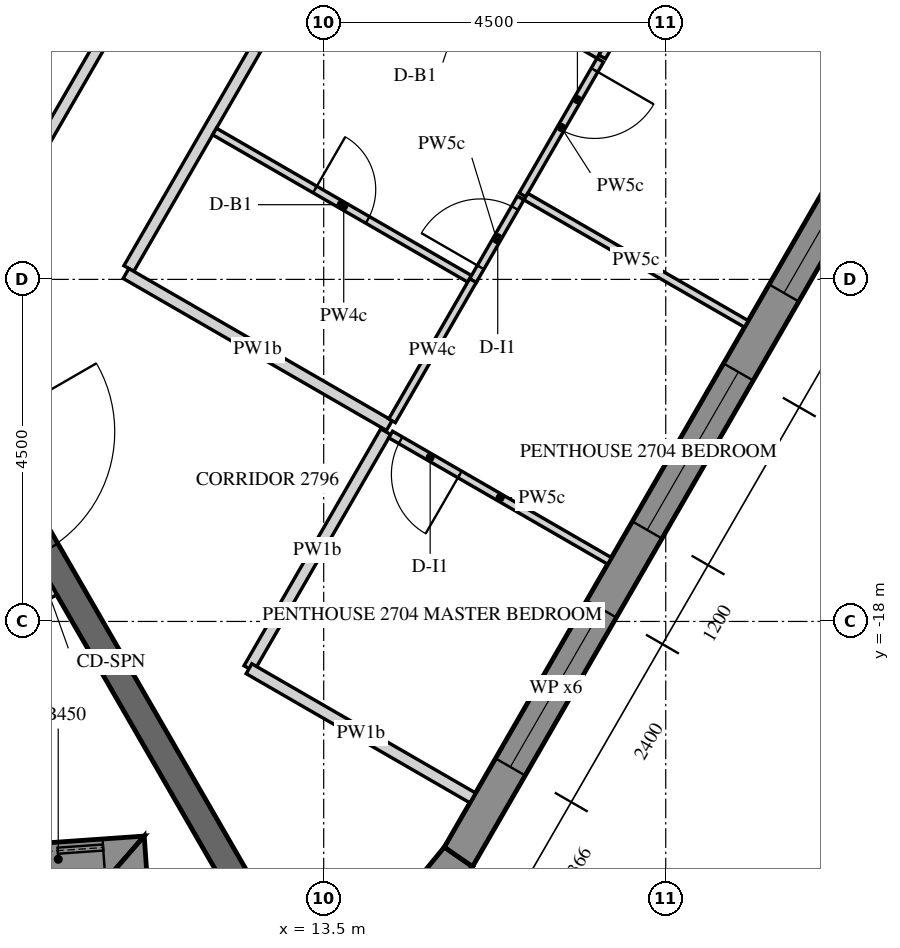
"""IFC4 building model, lengths in metres.
Left out: names, types, materials, properties, quantities, classifications, styles, units other than length and angle.
Written with IfcOpenShell. Run it as: python <this file> out.ifc"""

import sys

from ifc_helpers import new_model, si_unit, direction, frame, frame_2d, origin, place, context, subcontext, project, spatial, polyline, rectangle, outline, extrude, element, fill, save


model = new_model("IFC4")
c1 = context("Model", 3, precision=1e-05, world=origin(), true_north=direction((0.0, 1.0)))
c2 = subcontext(c1, "Body", "Model", "MODEL_VIEW")
j1 = project(units=[si_unit("LENGTHUNIT", "METRE"), si_unit("PLANEANGLEUNIT", "RADIAN")], contexts=[c1])
p1 = place(None, origin())
s1 = spatial("IfcSite", under=j1, at=p1, CompositionType="ELEMENT")
p2 = place(p1, origin())
s2 = spatial("IfcBuilding", under=s1, at=p2, CompositionType="ELEMENT")
p3 = place(p2, frame((0.0, 0.0, 353.4)))
s3 = spatial("IfcBuildingStorey", under=s2, at=p3, CompositionType="ELEMENT", Elevation=353.4)
p4 = place(p3, frame((-9.751, -22.51, -0.15), z_axis=(0.0, 0.0, 1.0), x_axis=(0.997564460173, 0.06975061147, 0.0)))
e1 = element("IfcWall", 1, at=p4, inside=s3, PredefinedType="SOLIDWALL", context=c2, shape_type="SweptSolid", body=[
    extrude(outline(polyline([(0.225, -0.225), (20.507, -0.225), (20.957, 0.225), (-0.225, 0.225), (0.225, -0.225)])), origin(), (0.0, 0.0, 1.0), 3.9),
])
p5 = place(p4, frame((0.325, 0.0, 1.05)))
e2 = element("IfcOpeningElement", 2, at=p5, cuts=e1, PredefinedType="OPENING", context=c2, shape_type="SweptSolid", body=[
    extrude(rectangle(XDim=0.9, YDim=1.5, at=frame_2d((0.45, 0.75))), frame((0.0, 0.235, 0.0), z_axis=(0.0, -1.0, 0.0), x_axis=(1.0, 0.0, 0.0)), (0.0, 0.0, 1.0), 0.47),
])
p6 = place(p4, frame((1.525, 0.0, 0.15)))
e3 = element("IfcOpeningElement", 3, at=p6, cuts=e1, PredefinedType="OPENING", context=c2, shape_type="SweptSolid", body=[
    extrude(rectangle(XDim=1.2, YDim=2.4, at=frame_2d((0.6, 1.2))), frame((0.0, 0.235, 0.0), z_axis=(0.0, -1.0, 0.0), x_axis=(1.0, 0.0, 0.0)), (0.0, 0.0, 1.0), 0.47),
])
p7 = place(p4, frame((3.766, 0.0, 1.05)))
e4 = element("IfcOpeningElement", 4, at=p7, cuts=e1, PredefinedType="OPENING", context=c2, shape_type="SweptSolid", body=[
    extrude(rectangle(XDim=0.9, YDim=1.5, at=frame_2d((0.45, 0.75))), frame((0.0, 0.235, 0.0), z_axis=(0.0, -1.0, 0.0), x_axis=(1.0, 0.0, 0.0)), (0.0, 0.0, 1.0), 0.47),
])
p8 = place(p4, frame((4.966, 0.0, 0.15)))
e5 = element("IfcOpeningElement", 5, at=p8, cuts=e1, PredefinedType="OPENING", context=c2, shape_type="SweptSolid", body=[
    extrude(rectangle(XDim=1.2, YDim=2.4, at=frame_2d((0.6, 1.2))), frame((0.0, 0.235, 0.0), z_axis=(0.0, -1.0, 0.0), x_axis=(1.0, 0.0, 0.0)), (0.0, 0.0, 1.0), 0.47),
])
p9 = place(p4, frame((7.366, 0.0, 1.05)))
e6 = element("IfcOpeningElement", 6, at=p9, cuts=e1, PredefinedType="OPENING", context=c2, shape_type="SweptSolid", body=[
    extrude(rectangle(XDim=0.9, YDim=1.5, at=frame_2d((0.45, 0.75))), frame((0.0, 0.235, 0.0), z_axis=(0.0, -1.0, 0.0), x_axis=(1.0, 0.0, 0.0)), (0.0, 0.0, 1.0), 0.47),
])
p10 = place(p4, frame((8.566, 0.0, 0.15)))
e7 = element("IfcOpeningElement", 7, at=p10, cuts=e1, PredefinedType="OPENING", context=c2, shape_type="SweptSolid", body=[
    extrude(rectangle(XDim=1.2, YDim=2.4, at=frame_2d((0.6, 1.2))), frame((0.0, 0.235, 0.0), z_axis=(0.0, -1.0, 0.0), x_axis=(1.0, 0.0, 0.0)), (0.0, 0.0, 1.0), 0.47),
])
p11 = place(p4, frame((10.966, 0.0, 1.05)))
e8 = element("IfcOpeningElement", 8, at=p11, cuts=e1, PredefinedType="OPENING", context=c2, shape_type="SweptSolid", body=[
    extrude(rectangle(XDim=0.9, YDim=1.5, at=frame_2d((0.45, 0.75))), frame((0.0, 0.235, 0.0), z_axis=(0.0, -1.0, 0.0), x_axis=(1.0, 0.0, 0.0)), (0.0, 0.0, 1.0), 0.47),
])
p12 = place(p4, frame((12.166, 0.0, 0.15)))
e9 = element("IfcOpeningElement", 9, at=p12, cuts=e1, PredefinedType="OPENING", context=c2, shape_type="SweptSolid", body=[
    extrude(rectangle(XDim=1.2, YDim=2.4, at=frame_2d((0.6, 1.2))), frame((0.0, 0.235, 0.0), z_axis=(0.0, -1.0, 0.0), x_axis=(1.0, 0.0, 0.0)), (0.0, 0.0, 1.0), 0.47),
])
p13 = place(p4, frame((14.566, 0.0, 1.05)))
e10 = element("IfcOpeningElement", 10, at=p13, cuts=e1, PredefinedType="OPENING", context=c2, shape_type="SweptSolid", body=[
    extrude(rectangle(XDim=0.9, YDim=1.5, at=frame_2d((0.45, 0.75))), frame((0.0, 0.235, 0.0), z_axis=(0.0, -1.0, 0.0), x_axis=(1.0, 0.0, 0.0)), (0.0, 0.0, 1.0), 0.47),
])
p14 = place(p4, frame((15.766, 0.0, 0.15)))
e11 = element("IfcOpeningElement", 11, at=p14, cuts=e1, PredefinedType="OPENING", context=c2, shape_type="SweptSolid", body=[
    extrude(rectangle(XDim=1.2, YDim=2.4, at=frame_2d((0.6, 1.2))), frame((0.0, 0.235, 0.0), z_axis=(0.0, -1.0, 0.0), x_axis=(1.0, 0.0, 0.0)), (0.0, 0.0, 1.0), 0.47),
])
p15 = place(p4, frame((18.007, 0.0, 1.05)))
e12 = element("IfcOpeningElement", 12, at=p15, cuts=e1, PredefinedType="OPENING", context=c2, shape_type="SweptSolid", body=[
    extrude(rectangle(XDim=0.9, YDim=1.5, at=frame_2d((0.45, 0.75))), frame((0.0, 0.235, 0.0), z_axis=(0.0, -1.0, 0.0), x_axis=(1.0, 0.0, 0.0)), (0.0, 0.0, 1.0), 0.47),
])
p16 = place(p4, frame((19.207, 0.0, 0.15)))
e13 = element("IfcOpeningElement", 13, at=p16, cuts=e1, PredefinedType="OPENING", context=c2, shape_type="SweptSolid", body=[
    extrude(rectangle(XDim=1.2, YDim=2.4, at=frame_2d((0.6, 1.2))), frame((0.0, 0.235, 0.0), z_axis=(0.0, -1.0, 0.0), x_axis=(1.0, 0.0, 0.0)), (0.0, 0.0, 1.0), 0.47),
])
p17 = place(p3, frame((10.93, -21.064, -0.15), z_axis=(0.0, 0.0, 1.0), x_axis=(0.069702791886, -0.99756780261, 0.0)))
e14 = element("IfcWall", 14, at=p17, inside=s3, PredefinedType="SOLIDWALL", context=c2, shape_type="SweptSolid", body=[
    extrude(outline(polyline([(0.225, -0.225), (2.225, -0.225), (1.775, 0.225), (-0.225, 0.225), (0.225, -0.225)])), origin(), (0.0, 0.0, 1.0), 3.9),
])
p18 = place(p3, frame((14.497, -22.044, -0.15), z_axis=(0.0, 0.0, 1.0), x_axis=(0.633867343651, 0.773441782329, 0.0)))
e15 = element("IfcWall", 15, at=p18, inside=s3, PredefinedType="SOLIDWALL", context=c2, shape_type="SweptSolid", body=[
    extrude(outline(polyline([(-0.037, -0.225), (1.243, -0.225), (1.206, 0.225), (0.037, 0.225), (-0.037, -0.225)])), origin(), (0.0, 0.0, 1.0), 3.9),
])
p19 = place(p3, frame((15.273, -21.097, -0.15), z_axis=(0.0, 0.0, 1.0), x_axis=(0.499997453958, 0.866026873738, 0.0)))
e16 = element("IfcWall", 16, at=p19, inside=s3, PredefinedType="SOLIDWALL", context=c2, shape_type="SweptSolid", body=[
    extrude(outline(polyline([(-0.018, -0.225), (23.152, -0.225), (23.11, 0.225), (0.018, 0.225), (-0.018, -0.225)])), origin(), (0.0, 0.0, 1.0), 3.9),
])
p20 = place(p19, frame((1.366, 0.0, 0.45)))
e17 = element("IfcOpeningElement", 17, at=p20, cuts=e16, PredefinedType="OPENING", context=c2, shape_type="SweptSolid", body=[
    extrude(rectangle(XDim=2.4, YDim=3.0, at=frame_2d((1.2, 1.5))), frame((0.0, 0.235, 0.0), z_axis=(0.0, -1.0, 0.0), x_axis=(1.0, 0.0, 0.0)), (0.0, 0.0, 1.0), 0.47),
])
p21 = place(p19, frame((4.966, 0.0, 0.45)))
e18 = element("IfcOpeningElement", 18, at=p21, cuts=e16, PredefinedType="OPENING", context=c2, shape_type="SweptSolid", body=[
    extrude(rectangle(XDim=2.4, YDim=3.0, at=frame_2d((1.2, 1.5))), frame((0.0, 0.235, 0.0), z_axis=(0.0, -1.0, 0.0), x_axis=(1.0, 0.0, 0.0)), (0.0, 0.0, 1.0), 0.47),
])
p22 = place(p19, frame((8.566, 0.0, 0.45)))
e19 = element("IfcOpeningElement", 19, at=p22, cuts=e16, PredefinedType="OPENING", context=c2, shape_type="SweptSolid", body=[
    extrude(rectangle(XDim=2.4, YDim=3.0, at=frame_2d((1.2, 1.5))), frame((0.0, 0.235, 0.0), z_axis=(0.0, -1.0, 0.0), x_axis=(1.0, 0.0, 0.0)), (0.0, 0.0, 1.0), 0.47),
])
p23 = place(p19, frame((12.166, 0.0, 0.45)))
e20 = element("IfcOpeningElement", 20, at=p23, cuts=e16, PredefinedType="OPENING", context=c2, shape_type="SweptSolid", body=[
    extrude(rectangle(XDim=2.4, YDim=3.0, at=frame_2d((1.2, 1.5))), frame((0.0, 0.235, 0.0), z_axis=(0.0, -1.0, 0.0), x_axis=(1.0, 0.0, 0.0)), (0.0, 0.0, 1.0), 0.47),
])
p24 = place(p19, frame((15.766, 0.0, 0.45)))
e21 = element("IfcOpeningElement", 21, at=p24, cuts=e16, PredefinedType="OPENING", context=c2, shape_type="SweptSolid", body=[
    extrude(rectangle(XDim=2.4, YDim=3.0, at=frame_2d((1.2, 1.5))), frame((0.0, 0.235, 0.0), z_axis=(0.0, -1.0, 0.0), x_axis=(1.0, 0.0, 0.0)), (0.0, 0.0, 1.0), 0.47),
])
p25 = place(p19, frame((19.366, 0.0, 0.45)))
e22 = element("IfcOpeningElement", 22, at=p25, cuts=e16, PredefinedType="OPENING", context=c2, shape_type="SweptSolid", body=[
    extrude(rectangle(XDim=2.4, YDim=3.0, at=frame_2d((1.2, 1.5))), frame((0.0, 0.235, 0.0), z_axis=(0.0, -1.0, 0.0), x_axis=(1.0, 0.0, 0.0)), (0.0, 0.0, 1.0), 0.47),
])
p26 = place(p3, frame((5.773, -10.0, -0.15), z_axis=(0.0, 0.0, 1.0), x_axis=(0.500007911273, -0.866020836161, 0.0)))
e23 = element("IfcWall", 23, at=p26, inside=s3, PredefinedType="SHEAR", context=c2, shape_type="SweptSolid", body=[
    extrude(rectangle(XDim=14.51, YDim=0.35, at=frame_2d((7.255, 0.0))), origin(), (0.0, 0.0, 1.0), 3.9),
])
p27 = place(p26, frame((6.355, 0.0, 0.15)))
e24 = element("IfcOpeningElement", 24, at=p27, cuts=e23, PredefinedType="OPENING", context=c2, shape_type="SweptSolid", body=[
    extrude(rectangle(XDim=1.8, YDim=2.4, at=frame_2d((0.9, 1.2))), frame((0.0, 0.185, 0.0), z_axis=(0.0, -1.0, 0.0), x_axis=(1.0, 0.0, 0.0)), (0.0, 0.0, 1.0), 0.37),
])
p28 = place(p3, frame((8.456, -18.446, 0.0), z_axis=(0.0, 0.0, 1.0), x_axis=(0.866013532718, 0.500020560727, 0.0)))
e25 = element("IfcWall", 25, at=p28, inside=s3, PredefinedType="PARTITIONING", context=c2, shape_type="SweptSolid", body=[
    extrude(rectangle(XDim=1.725, YDim=0.15, at=frame_2d((0.863, 0.0))), origin(), (0.0, 0.0, 1.0), 2.82),
])
p29 = place(p3, frame((10.937, -13.357, 0.0), z_axis=(0.0, 0.0, 1.0), x_axis=(0.499993317597, 0.866029261837, 0.0)))
e26 = element("IfcWall", 26, at=p29, inside=s3, PredefinedType="PARTITIONING", context=c2, shape_type="SweptSolid", body=[
    extrude(rectangle(XDim=13.966, YDim=0.15, at=frame_2d((6.983, 0.0))), origin(), (0.0, 0.0, 1.0), 2.82),
])
p30 = place(p29, frame((3.325, 0.0, 0.0)))
e27 = element("IfcOpeningElement", 27, at=p30, cuts=e26, PredefinedType="OPENING", context=c2, shape_type="SweptSolid", body=[
    extrude(rectangle(XDim=1.0, YDim=2.1, at=frame_2d((0.5, 1.05))), frame((0.0, 0.085, 0.0), z_axis=(0.0, -1.0, 0.0), x_axis=(1.0, 0.0, 0.0)), (0.0, 0.0, 1.0), 0.17),
])
p31 = place(p3, frame((14.363, -15.422, 0.0), z_axis=(0.0, 0.0, 1.0), x_axis=(-0.866026010844, 0.49999894854, 0.0)))
e28 = element("IfcWall", 28, at=p31, inside=s3, PredefinedType="PARTITIONING", context=c2, shape_type="SweptSolid", body=[
    extrude(rectangle(XDim=4.0, YDim=0.15, at=frame_2d((2.0, 0.0))), origin(), (0.0, 0.0, 1.0), 2.82),
])
p32 = place(p3, frame((12.517, -18.62, 0.0), z_axis=(0.0, 0.0, 1.0), x_axis=(0.500006299954, 0.866021766474, 0.0)))
e29 = element("IfcWall", 29, at=p32, inside=s3, PredefinedType="PARTITIONING", context=c2, shape_type="SweptSolid", body=[
    extrude(rectangle(XDim=3.599, YDim=0.15, at=frame_2d((1.799, 0.0))), origin(), (0.0, 0.0, 1.0), 2.82),
])
p33 = place(p3, frame((15.461, -20.321, 0.0), z_axis=(0.0, 0.0, 1.0), x_axis=(-0.866010935101, 0.500025059658, 0.0)))
e30 = element("IfcWall", 30, at=p33, inside=s3, PredefinedType="PARTITIONING", context=c2, shape_type="SweptSolid", body=[
    extrude(rectangle(XDim=3.399, YDim=0.15, at=frame_2d((1.699, 0.0))), origin(), (0.0, 0.0, 1.0), 2.82),
])
p34 = place(p3, frame((11.879, -8.124, 0.0), z_axis=(0.0, 0.0, 1.0), x_axis=(-0.500006178143, -0.866021836803, 0.0)))
e31 = element("IfcWall", 31, at=p34, inside=s3, PredefinedType="PARTITIONING", context=c2, shape_type="SweptSolid", body=[
    extrude(rectangle(XDim=4.122, YDim=0.15, at=frame_2d((2.061, 0.0))), origin(), (0.0, 0.0, 1.0), 2.82),
])
p35 = place(p3, frame((17.138, -10.616, 0.0), z_axis=(0.0, 0.0, 1.0), x_axis=(-0.500015134316, -0.866016665807, 0.0)))
e32 = element("IfcWall", 32, at=p35, inside=s3, PredefinedType="PARTITIONING", context=c2, shape_type="SweptSolid", body=[
    extrude(rectangle(XDim=2.046, YDim=0.1, at=frame_2d((1.023, 0.0))), origin(), (0.0, 0.0, 1.0), 2.82),
])
p36 = place(p35, frame((0.15, 0.0, 0.0)))
e33 = element("IfcOpeningElement", 33, at=p36, cuts=e32, PredefinedType="OPENING", context=c2, shape_type="SweptSolid", body=[
    extrude(rectangle(XDim=0.9, YDim=2.1, at=frame_2d((0.45, 1.05))), frame((0.0, 0.06, 0.0), z_axis=(0.0, -1.0, 0.0), x_axis=(1.0, 0.0, 0.0)), (0.0, 0.0, 1.0), 0.12),
])
p37 = place(p3, frame((16.159, -12.411, 0.0), z_axis=(0.0, 0.0, 1.0), x_axis=(0.866032680314, -0.499987396469, 0.0)))
e34 = element("IfcWall", 34, at=p37, inside=s3, PredefinedType="PARTITIONING", context=c2, shape_type="SweptSolid", body=[
    extrude(rectangle(XDim=3.35, YDim=0.1, at=frame_2d((1.675, 0.0))), origin(), (0.0, 0.0, 1.0), 2.82),
])
p38 = place(p3, frame((18.263, -8.667, 0.0), z_axis=(0.0, 0.0, 1.0), x_axis=(-0.50002983664, -0.866008176907, 0.0)))
e35 = element("IfcWall", 35, at=p38, inside=s3, PredefinedType="PARTITIONING", context=c2, shape_type="SweptSolid", body=[
    extrude(rectangle(XDim=2.2, YDim=0.1, at=frame_2d((1.1, 0.0))), origin(), (0.0, 0.0, 1.0), 2.82),
])
p39 = place(p3, frame((12.064, -11.555, 0.0), z_axis=(0.0, 0.0, 1.0), x_axis=(0.866037464623, -0.499979109433, 0.0)))
e36 = element("IfcWall", 36, at=p39, inside=s3, PredefinedType="PARTITIONING", context=c2, shape_type="SweptSolid", body=[
    extrude(rectangle(XDim=3.925, YDim=0.1, at=frame_2d((1.962, 0.0))), origin(), (0.0, 0.0, 1.0), 2.82),
])
p40 = place(p39, frame((1.525, 0.0, 0.0)))
e37 = element("IfcOpeningElement", 37, at=p40, cuts=e36, PredefinedType="OPENING", context=c2, shape_type="SweptSolid", body=[
    extrude(rectangle(XDim=0.8, YDim=2.1, at=frame_2d((0.4, 1.05))), frame((0.0, 0.06, 0.0), z_axis=(0.0, -1.0, 0.0), x_axis=(1.0, 0.0, 0.0)), (0.0, 0.0, 1.0), 0.12),
])
p41 = place(p3, frame((15.462, -13.519, 0.0), z_axis=(0.0, 0.0, 1.0), x_axis=(0.50004158446, 0.866001393654, 0.0)))
e38 = element("IfcWall", 38, at=p41, inside=s3, PredefinedType="PARTITIONING", context=c2, shape_type="SweptSolid", body=[
    extrude(rectangle(XDim=1.258, YDim=0.1, at=frame_2d((0.629, 0.0))), origin(), (0.0, 0.0, 1.0), 2.82),
])
p42 = place(p41, frame((0.205, 0.0, 0.0)))
e39 = element("IfcOpeningElement", 39, at=p42, cuts=e38, PredefinedType="OPENING", context=c2, shape_type="SweptSolid", body=[
    extrude(rectangle(XDim=0.9, YDim=2.1, at=frame_2d((0.45, 1.05))), frame((0.0, 0.06, 0.0), z_axis=(0.0, -1.0, 0.0), x_axis=(1.0, 0.0, 0.0)), (0.0, 0.0, 1.0), 0.12),
])
p43 = place(p3, frame((17.12, -10.548, 0.0), z_axis=(0.0, 0.0, 1.0), x_axis=(-0.866032409438, 0.499987865656, 0.0)))
e40 = element("IfcWall", 40, at=p43, inside=s3, PredefinedType="PARTITIONING", context=c2, shape_type="SweptSolid", body=[
    extrude(rectangle(XDim=3.875, YDim=0.1, at=frame_2d((1.938, 0.0))), origin(), (0.0, 0.0, 1.0), 2.82),
])
p44 = place(p43, frame((1.55, 0.0, 0.0)))
e41 = element("IfcOpeningElement", 41, at=p44, cuts=e40, PredefinedType="OPENING", context=c2, shape_type="SweptSolid", body=[
    extrude(rectangle(XDim=0.8, YDim=2.1, at=frame_2d((0.4, 1.05))), frame((0.0, 0.06, 0.0), z_axis=(0.0, -1.0, 0.0), x_axis=(1.0, 0.0, 0.0)), (0.0, 0.0, 1.0), 0.12),
])
p45 = place(p3, frame((14.4, -15.359, 0.0), z_axis=(0.0, 0.0, 1.0), x_axis=(0.499987164874, 0.866032814021, 0.0)))
e42 = element("IfcWall", 42, at=p45, inside=s3, PredefinedType="PARTITIONING", context=c2, shape_type="SweptSolid", body=[
    extrude(rectangle(XDim=2.129, YDim=0.1, at=frame_2d((1.064, 0.0))), origin(), (0.0, 0.0, 1.0), 2.82),
])
p46 = place(p3, frame((17.261, -17.204, 0.0), z_axis=(0.0, 0.0, 1.0), x_axis=(-0.866020521143, 0.500008456887, 0.0)))
e43 = element("IfcWall", 43, at=p46, inside=s3, PredefinedType="PARTITIONING", context=c2, shape_type="SweptSolid", body=[
    extrude(rectangle(XDim=3.325, YDim=0.1, at=frame_2d((1.663, 0.0))), origin(), (0.0, 0.0, 1.0), 2.82),
])
p47 = place(p46, frame((2.275, 0.0, 0.0)))
e44 = element("IfcOpeningElement", 44, at=p47, cuts=e43, PredefinedType="OPENING", context=c2, shape_type="SweptSolid", body=[
    extrude(rectangle(XDim=0.9, YDim=2.1, at=frame_2d((0.45, 1.05))), frame((0.0, 0.06, 0.0), z_axis=(0.0, -1.0, 0.0), x_axis=(1.0, 0.0, 0.0)), (0.0, 0.0, 1.0), 0.12),
])
p48 = place(p16, frame((0.0, 0.15, 0.0)))
e45 = element("IfcDoor", 45, at=p48, inside=s3, OperationType="SLIDING_TO_LEFT", PredefinedType="DOOR", context=c2, shape_type="SweptSolid", body=[
    extrude(rectangle(XDim=1.2, YDim=2.4, at=frame_2d((0.6, 1.2))), frame((0.0, 0.025, 0.0), z_axis=(0.0, -1.0, 0.0), x_axis=(1.0, 0.0, 0.0)), (0.0, 0.0, 1.0), 0.05),
])
fill(e13, e45)
p49 = place(p20, frame((0.0, 0.155, 0.0)))
e46 = element("IfcWindow", 46, at=p49, inside=s3, PartitioningType="DOUBLE_PANEL_VERTICAL", PredefinedType="WINDOW", context=c2, shape_type="SweptSolid", body=[
    extrude(rectangle(XDim=2.4, YDim=3.0, at=frame_2d((1.2, 1.5))), frame((0.0, 0.03, 0.0), z_axis=(0.0, -1.0, 0.0), x_axis=(1.0, 0.0, 0.0)), (0.0, 0.0, 1.0), 0.06),
])
fill(e17, e46)
p50 = place(p21, frame((0.0, 0.155, 0.0)))
e47 = element("IfcWindow", 47, at=p50, inside=s3, PartitioningType="DOUBLE_PANEL_VERTICAL", PredefinedType="WINDOW", context=c2, shape_type="SweptSolid", body=[
    extrude(rectangle(XDim=2.4, YDim=3.0, at=frame_2d((1.2, 1.5))), frame((0.0, 0.03, 0.0), z_axis=(0.0, -1.0, 0.0), x_axis=(1.0, 0.0, 0.0)), (0.0, 0.0, 1.0), 0.06),
])
fill(e18, e47)
p51 = place(p22, frame((0.0, 0.155, 0.0)))
e48 = element("IfcWindow", 48, at=p51, inside=s3, PartitioningType="DOUBLE_PANEL_VERTICAL", PredefinedType="WINDOW", context=c2, shape_type="SweptSolid", body=[
    extrude(rectangle(XDim=2.4, YDim=3.0, at=frame_2d((1.2, 1.5))), frame((0.0, 0.03, 0.0), z_axis=(0.0, -1.0, 0.0), x_axis=(1.0, 0.0, 0.0)), (0.0, 0.0, 1.0), 0.06),
])
fill(e19, e48)
p52 = place(p40, origin())
e49 = element("IfcDoor", 49, at=p52, inside=s3, OperationType="SINGLE_SWING_RIGHT", PredefinedType="DOOR", context=c2, shape_type="SweptSolid", body=[
    extrude(rectangle(XDim=0.8, YDim=2.1, at=frame_2d((0.4, 1.05))), frame((0.0, 0.025, 0.0), z_axis=(0.0, -1.0, 0.0), x_axis=(1.0, 0.0, 0.0)), (0.0, 0.0, 1.0), 0.05),
])
fill(e37, e49)
p53 = place(p36, origin())
e50 = element("IfcDoor", 50, at=p53, inside=s3, OperationType="SINGLE_SWING_RIGHT", PredefinedType="DOOR", context=c2, shape_type="SweptSolid", body=[
    extrude(rectangle(XDim=0.9, YDim=2.1, at=frame_2d((0.45, 1.05))), frame((0.0, 0.025, 0.0), z_axis=(0.0, -1.0, 0.0), x_axis=(1.0, 0.0, 0.0)), (0.0, 0.0, 1.0), 0.05),
])
fill(e33, e50)
p54 = place(p47, origin())
e51 = element("IfcDoor", 51, at=p54, inside=s3, OperationType="SINGLE_SWING_RIGHT", PredefinedType="DOOR", context=c2, shape_type="SweptSolid", body=[
    extrude(rectangle(XDim=0.9, YDim=2.1, at=frame_2d((0.45, 1.05))), frame((0.0, 0.025, 0.0), z_axis=(0.0, -1.0, 0.0), x_axis=(1.0, 0.0, 0.0)), (0.0, 0.0, 1.0), 0.05),
])
fill(e44, e51)
p55 = place(p42, origin())
e52 = element("IfcDoor", 52, at=p55, inside=s3, OperationType="SINGLE_SWING_LEFT", PredefinedType="DOOR", context=c2, shape_type="SweptSolid", body=[
    extrude(rectangle(XDim=0.9, YDim=2.1, at=frame_2d((0.45, 1.05))), frame((0.0, 0.025, 0.0), z_axis=(0.0, -1.0, 0.0), x_axis=(1.0, 0.0, 0.0)), (0.0, 0.0, 1.0), 0.05),
])
fill(e39, e52)
save(model, sys.argv[1])
